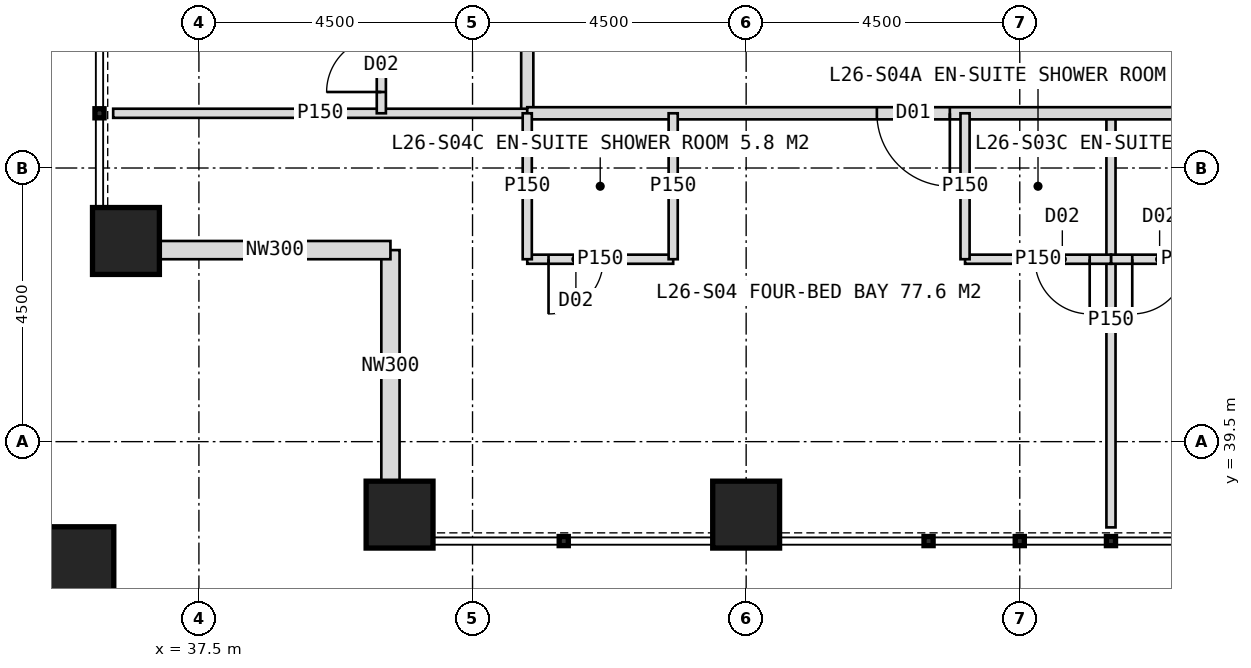
"""IFC4 building model, lengths in metres.
Left out: names, types, materials, properties, quantities, classifications, styles, units other than length and angle.
Written with IfcOpenShell. Run it as: python <this file> out.ifc"""

import sys

from ifc_helpers import new_model, si_unit, direction, frame, frame_2d, origin, origin_2d, place, context, subcontext, project, spatial, rectangle, hollow_rectangle, extrude, element, fill, save


model = new_model("IFC4")
c1 = context("Model", 3, precision=1e-05, world=origin(), true_north=direction((0.0, 1.0)))
c2 = subcontext(c1, "Body", "Model", "MODEL_VIEW")
j1 = project(units=[si_unit("LENGTHUNIT", "METRE"), si_unit("PLANEANGLEUNIT", "RADIAN")], contexts=[c1])
p1 = place(None, origin())
s1 = spatial("IfcSite", under=j1, at=p1, CompositionType="ELEMENT")
p2 = place(p1, origin())
s2 = spatial("IfcBuilding", under=s1, at=p2, CompositionType="ELEMENT")
p3 = place(p2, frame((0.0, 0.0, 112.0)))
s3 = spatial("IfcBuildingStorey", under=s2, at=p3, CompositionType="ELEMENT", Elevation=112.0)
for number, where, z_axis, x_axis in (
    (1, (40.8, 38.3, 0.0), (0.0, 0.0, 1.0), (1.0, 0.0, 0.0)),
    (2, (36.3, 42.8, 0.0), (0.0, 0.0, 1.0), (1.0, 0.0, 0.0)),
    (3, (46.5, 38.3, 0.0), (0.0, 0.0, 1.0), (1.0, 0.0, 0.0)),
):
    element("IfcColumn", number, at=place(p3, frame(where, z_axis=z_axis, x_axis=x_axis)), inside=s3, PredefinedType="COLUMN", context=c2, shape_type="SweptSolid", body=[
        extrude(hollow_rectangle(XDim=1.1, YDim=1.1, WallThickness=0.1, at=origin_2d()), origin(), (0.0, 0.0, 1.0), 4.0),
    ])
p4 = place(p3, frame((35.4, 37.4, 0.0), z_axis=(0.0, 0.0, 1.0), x_axis=(1.0, 0.0, 0.0)))
e4 = element("IfcColumn", 4, at=p4, inside=s3, PredefinedType="COLUMN", context=c2, shape_type="SweptSolid", body=[
    extrude(hollow_rectangle(XDim=1.4, YDim=1.4, WallThickness=0.08, at=origin_2d()), origin(), (0.0, 0.0, 1.0), 4.0),
])
for number, where, z_axis, x_axis in (
    (5, (40.65, 38.85, 0.0), (0.0, 0.0, 1.0), (0.0, 1.0, 0.0)),
    (6, (40.65, 42.65, 0.0), (0.0, 0.0, 1.0), (-1.0, 0.0, 0.0)),
):
    element("IfcWall", number, at=place(p3, frame(where, z_axis=z_axis, x_axis=x_axis)), inside=s3, PredefinedType="ELEMENTEDWALL", context=c2, shape_type="SweptSolid", body=[
        extrude(rectangle(XDim=3.8, YDim=0.3, at=frame_2d((1.9, 0.0))), origin(), (0.0, 0.0, 1.0), 4.0),
    ])
p5 = place(p3, frame((42.9, 44.9, 0.0), z_axis=(0.0, 0.0, 1.0), x_axis=(0.0, 1.0, 0.0)))
e7 = element("IfcWall", 7, at=p5, inside=s3, PredefinedType="PARTITIONING", context=c2, shape_type="SweptSolid", body=[
    extrude(rectangle(XDim=34.2, YDim=0.2, at=frame_2d((17.1, 0.0))), origin(), (0.0, 0.0, 1.0), 3.75),
])
p6 = place(p5, frame((3.25, 0.0, 0.0)))
e8 = element("IfcOpeningElement", 8, at=p6, cuts=e7, PredefinedType="OPENING", context=c2, shape_type="SweptSolid", body=[
    extrude(rectangle(XDim=1.2, YDim=2.2, at=frame_2d((0.6, 1.1))), frame((0.0, 0.11, 0.0), z_axis=(0.0, -1.0, 0.0), x_axis=(1.0, 0.0, 0.0)), (0.0, 0.0, 1.0), 0.22),
])
p7 = place(p5, frame((10.75, 0.0, 0.0)))
e9 = element("IfcOpeningElement", 9, at=p7, cuts=e7, PredefinedType="OPENING", context=c2, shape_type="SweptSolid", body=[
    extrude(rectangle(XDim=1.2, YDim=2.2, at=frame_2d((0.6, 1.1))), frame((0.0, 0.11, 0.0), z_axis=(0.0, -1.0, 0.0), x_axis=(1.0, 0.0, 0.0)), (0.0, 0.0, 1.0), 0.22),
])
p8 = place(p5, frame((19.75, 0.0, 0.0)))
e10 = element("IfcOpeningElement", 10, at=p8, cuts=e7, PredefinedType="OPENING", context=c2, shape_type="SweptSolid", body=[
    extrude(rectangle(XDim=1.2, YDim=2.2, at=frame_2d((0.6, 1.1))), frame((0.0, 0.11, 0.0), z_axis=(0.0, -1.0, 0.0), x_axis=(1.0, 0.0, 0.0)), (0.0, 0.0, 1.0), 0.22),
])
p9 = place(p5, frame((28.75, 0.0, 0.0)))
e11 = element("IfcOpeningElement", 11, at=p9, cuts=e7, PredefinedType="OPENING", context=c2, shape_type="SweptSolid", body=[
    extrude(rectangle(XDim=1.2, YDim=2.2, at=frame_2d((0.6, 1.1))), frame((0.0, 0.11, 0.0), z_axis=(0.0, -1.0, 0.0), x_axis=(1.0, 0.0, 0.0)), (0.0, 0.0, 1.0), 0.22),
])
p10 = place(p3, frame((42.9, 44.9, 0.0), z_axis=(0.0, 0.0, 1.0), x_axis=(-1.0, 0.0, 0.0)))
e12 = element("IfcWall", 12, at=p10, inside=s3, PredefinedType="PARTITIONING", context=c2, shape_type="SweptSolid", body=[
    extrude(rectangle(XDim=6.81, YDim=0.15, at=frame_2d((3.405, 0.0))), origin(), (0.0, 0.0, 1.0), 3.75),
])
p11 = place(p3, frame((40.5, 44.9, 0.0), z_axis=(0.0, 0.0, 1.0), x_axis=(0.0, 1.0, 0.0)))
e13 = element("IfcWall", 13, at=p11, inside=s3, PredefinedType="PARTITIONING", context=c2, shape_type="SweptSolid", body=[
    extrude(rectangle(XDim=3.0, YDim=0.15, at=frame_2d((1.5, 0.0))), origin(), (0.0, 0.0, 1.0), 3.75),
])
p12 = place(p11, frame((0.35, 0.0, 0.0)))
e14 = element("IfcOpeningElement", 14, at=p12, cuts=e13, PredefinedType="OPENING", context=c2, shape_type="SweptSolid", body=[
    extrude(rectangle(XDim=0.9, YDim=2.1, at=frame_2d((0.45, 1.05))), frame((0.0, 0.085, 0.0), z_axis=(0.0, -1.0, 0.0), x_axis=(1.0, 0.0, 0.0)), (0.0, 0.0, 1.0), 0.17),
])
p13 = place(p3, frame((52.5, 44.9, 0.0), z_axis=(0.0, 0.0, 1.0), x_axis=(0.0, -1.0, 0.0)))
e15 = element("IfcWall", 15, at=p13, inside=s3, PredefinedType="PARTITIONING", context=c2, shape_type="SweptSolid", body=[
    extrude(rectangle(XDim=6.81, YDim=0.15, at=frame_2d((3.405, 0.0))), origin(), (0.0, 0.0, 1.0), 3.75),
])
p14 = place(p3, frame((77.1, 44.9, 0.0), z_axis=(0.0, 0.0, 1.0), x_axis=(-1.0, 0.0, 0.0)))
e16 = element("IfcWall", 16, at=p14, inside=s3, PredefinedType="PARTITIONING", context=c2, shape_type="SweptSolid", body=[
    extrude(rectangle(XDim=34.2, YDim=0.2, at=frame_2d((17.1, 0.0))), origin(), (0.0, 0.0, 1.0), 3.75),
])
p15 = place(p14, frame((3.25, 0.0, 0.0)))
e17 = element("IfcOpeningElement", 17, at=p15, cuts=e16, PredefinedType="OPENING", context=c2, shape_type="SweptSolid", body=[
    extrude(rectangle(XDim=1.2, YDim=2.2, at=frame_2d((0.6, 1.1))), frame((0.0, 0.11, 0.0), z_axis=(0.0, -1.0, 0.0), x_axis=(1.0, 0.0, 0.0)), (0.0, 0.0, 1.0), 0.22),
])
p16 = place(p14, frame((9.25, 0.0, 0.0)))
e18 = element("IfcOpeningElement", 18, at=p16, cuts=e16, PredefinedType="OPENING", context=c2, shape_type="SweptSolid", body=[
    extrude(rectangle(XDim=1.2, YDim=2.2, at=frame_2d((0.6, 1.1))), frame((0.0, 0.11, 0.0), z_axis=(0.0, -1.0, 0.0), x_axis=(1.0, 0.0, 0.0)), (0.0, 0.0, 1.0), 0.22),
])
p17 = place(p14, frame((18.25, 0.0, 0.0)))
e19 = element("IfcOpeningElement", 19, at=p17, cuts=e16, PredefinedType="OPENING", context=c2, shape_type="SweptSolid", body=[
    extrude(rectangle(XDim=1.2, YDim=2.2, at=frame_2d((0.6, 1.1))), frame((0.0, 0.11, 0.0), z_axis=(0.0, -1.0, 0.0), x_axis=(1.0, 0.0, 0.0)), (0.0, 0.0, 1.0), 0.22),
])
p18 = place(p14, frame((27.25, 0.0, 0.0)))
e20 = element("IfcOpeningElement", 20, at=p18, cuts=e16, PredefinedType="OPENING", context=c2, shape_type="SweptSolid", body=[
    extrude(rectangle(XDim=1.2, YDim=2.2, at=frame_2d((0.6, 1.1))), frame((0.0, 0.11, 0.0), z_axis=(0.0, -1.0, 0.0), x_axis=(1.0, 0.0, 0.0)), (0.0, 0.0, 1.0), 0.22),
])
p19 = place(p3, frame((54.9, 42.5, 0.0), z_axis=(0.0, 0.0, 1.0), x_axis=(-1.0, 0.0, 0.0)))
e21 = element("IfcWall", 21, at=p19, inside=s3, PredefinedType="PARTITIONING", context=c2, shape_type="SweptSolid", body=[
    extrude(rectangle(XDim=2.4, YDim=0.15, at=frame_2d((1.2, 0.0))), origin(), (0.0, 0.0, 1.0), 3.75),
])
p20 = place(p19, frame((1.15, 0.0, 0.0)))
e22 = element("IfcOpeningElement", 22, at=p20, cuts=e21, PredefinedType="OPENING", context=c2, shape_type="SweptSolid", body=[
    extrude(rectangle(XDim=0.9, YDim=2.1, at=frame_2d((0.45, 1.05))), frame((0.0, 0.085, 0.0), z_axis=(0.0, -1.0, 0.0), x_axis=(1.0, 0.0, 0.0)), (0.0, 0.0, 1.0), 0.17),
])
p21 = place(p3, frame((52.5, 42.5, 0.0), z_axis=(0.0, 0.0, 1.0), x_axis=(-1.0, 0.0, 0.0)))
e23 = element("IfcWall", 23, at=p21, inside=s3, PredefinedType="PARTITIONING", context=c2, shape_type="SweptSolid", body=[
    extrude(rectangle(XDim=2.4, YDim=0.15, at=frame_2d((1.2, 0.0))), origin(), (0.0, 0.0, 1.0), 3.75),
])
p22 = place(p21, frame((0.35, 0.0, 0.0)))
e24 = element("IfcOpeningElement", 24, at=p22, cuts=e23, PredefinedType="OPENING", context=c2, shape_type="SweptSolid", body=[
    extrude(rectangle(XDim=0.9, YDim=2.1, at=frame_2d((0.45, 1.05))), frame((0.0, 0.085, 0.0), z_axis=(0.0, -1.0, 0.0), x_axis=(1.0, 0.0, 0.0)), (0.0, 0.0, 1.0), 0.17),
])
p23 = place(p3, frame((50.1, 44.9, 0.0), z_axis=(0.0, 0.0, 1.0), x_axis=(0.0, -1.0, 0.0)))
e25 = element("IfcWall", 25, at=p23, inside=s3, PredefinedType="PARTITIONING", context=c2, shape_type="SweptSolid", body=[
    extrude(rectangle(XDim=2.4, YDim=0.15, at=frame_2d((1.2, 0.0))), origin(), (0.0, 0.0, 1.0), 3.75),
])
p24 = place(p3, frame((45.3, 42.5, 0.0), z_axis=(0.0, 0.0, 1.0), x_axis=(-1.0, 0.0, 0.0)))
e26 = element("IfcWall", 26, at=p24, inside=s3, PredefinedType="PARTITIONING", context=c2, shape_type="SweptSolid", body=[
    extrude(rectangle(XDim=2.4, YDim=0.15, at=frame_2d((1.2, 0.0))), origin(), (0.0, 0.0, 1.0), 3.75),
])
p25 = place(p24, frame((1.15, 0.0, 0.0)))
e27 = element("IfcOpeningElement", 27, at=p25, cuts=e26, PredefinedType="OPENING", context=c2, shape_type="SweptSolid", body=[
    extrude(rectangle(XDim=0.9, YDim=2.1, at=frame_2d((0.45, 1.05))), frame((0.0, 0.085, 0.0), z_axis=(0.0, -1.0, 0.0), x_axis=(1.0, 0.0, 0.0)), (0.0, 0.0, 1.0), 0.17),
])
for number, where, z_axis, x_axis in (
    (28, (45.3, 44.9, 0.0), (0.0, 0.0, 1.0), (0.0, -1.0, 0.0)),
    (29, (42.9, 44.9, 0.0), (0.0, 0.0, 1.0), (0.0, -1.0, 0.0)),
):
    element("IfcWall", number, at=place(p3, frame(where, z_axis=z_axis, x_axis=x_axis)), inside=s3, PredefinedType="PARTITIONING", context=c2, shape_type="SweptSolid", body=[
        extrude(rectangle(XDim=2.4, YDim=0.15, at=frame_2d((1.2, 0.0))), origin(), (0.0, 0.0, 1.0), 3.75),
    ])
p26 = place(p12, origin())
e30 = element("IfcDoor", 30, at=p26, inside=s3, OperationType="SINGLE_SWING_LEFT", PredefinedType="DOOR", context=c2, shape_type="SweptSolid", body=[
    extrude(rectangle(XDim=0.9, YDim=2.1, at=frame_2d((0.45, 1.05))), frame((0.0, 0.025, 0.0), z_axis=(0.0, -1.0, 0.0), x_axis=(1.0, 0.0, 0.0)), (0.0, 0.0, 1.0), 0.05),
])
fill(e14, e30)
p27 = place(p20, origin())
e31 = element("IfcDoor", 31, at=p27, inside=s3, OperationType="SINGLE_SWING_RIGHT", PredefinedType="DOOR", context=c2, shape_type="SweptSolid", body=[
    extrude(rectangle(XDim=0.9, YDim=2.1, at=frame_2d((0.45, 1.05))), frame((0.0, 0.025, 0.0), z_axis=(0.0, -1.0, 0.0), x_axis=(1.0, 0.0, 0.0)), (0.0, 0.0, 1.0), 0.05),
])
fill(e22, e31)
p28 = place(p18, origin())
e32 = element("IfcDoor", 32, at=p28, inside=s3, OperationType="SINGLE_SWING_LEFT", PredefinedType="DOOR", context=c2, shape_type="SweptSolid", body=[
    extrude(rectangle(XDim=1.2, YDim=2.2, at=frame_2d((0.6, 1.1))), frame((0.0, 0.025, 0.0), z_axis=(0.0, -1.0, 0.0), x_axis=(1.0, 0.0, 0.0)), (0.0, 0.0, 1.0), 0.05),
])
fill(e20, e32)
p29 = place(p22, origin())
e33 = element("IfcDoor", 33, at=p29, inside=s3, OperationType="SINGLE_SWING_LEFT", PredefinedType="DOOR", context=c2, shape_type="SweptSolid", body=[
    extrude(rectangle(XDim=0.9, YDim=2.1, at=frame_2d((0.45, 1.05))), frame((0.0, 0.025, 0.0), z_axis=(0.0, -1.0, 0.0), x_axis=(1.0, 0.0, 0.0)), (0.0, 0.0, 1.0), 0.05),
])
fill(e24, e33)
p30 = place(p25, origin())
e34 = element("IfcDoor", 34, at=p30, inside=s3, OperationType="SINGLE_SWING_RIGHT", PredefinedType="DOOR", context=c2, shape_type="SweptSolid", body=[
    extrude(rectangle(XDim=0.9, YDim=2.1, at=frame_2d((0.45, 1.05))), frame((0.0, 0.025, 0.0), z_axis=(0.0, -1.0, 0.0), x_axis=(1.0, 0.0, 0.0)), (0.0, 0.0, 1.0), 0.05),
])
fill(e27, e34)
save(model, sys.argv[1])
